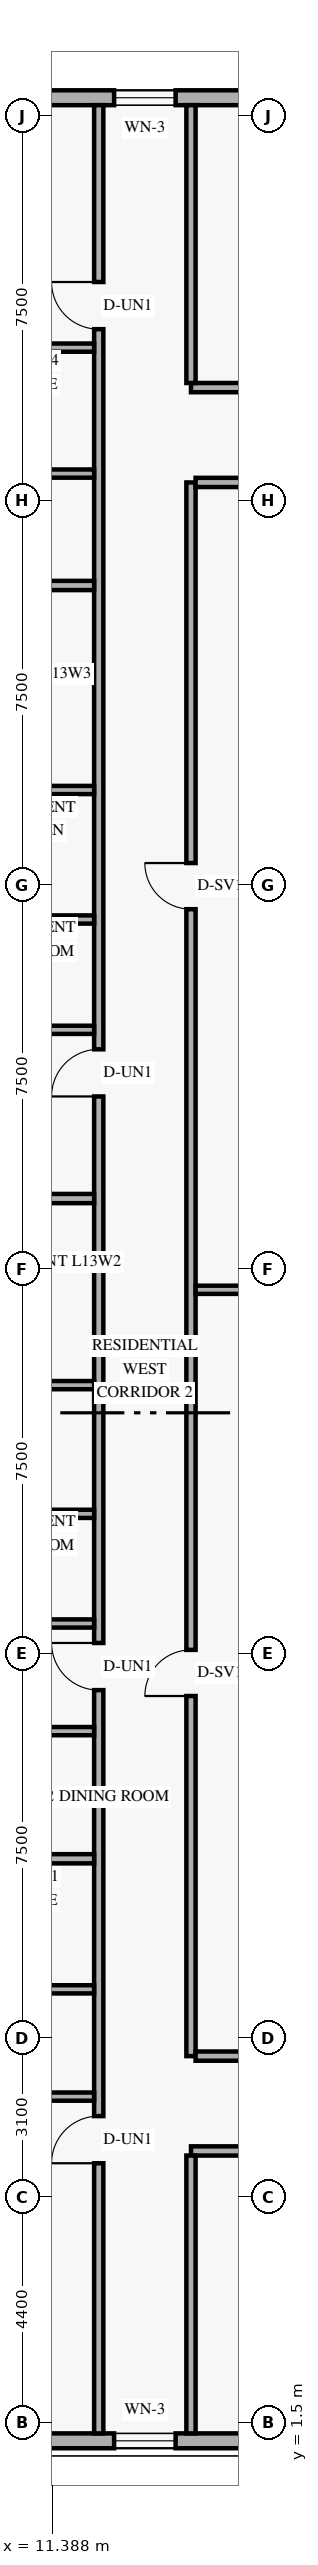
"""IFC4 building model, lengths in metres.
Left out: names, types, materials, properties, quantities, classifications, styles, units other than length and angle.
Written with IfcOpenShell. Run it as: python <this file> out.ifc"""

import sys

from ifc_helpers import new_model, si_unit, direction, frame, frame_2d, origin, place, context, subcontext, project, spatial, rectangle, extrude, element, fill, save


model = new_model("IFC4")
c1 = context("Model", 3, precision=1e-05, world=origin(), true_north=direction((0.0, 1.0)))
c2 = subcontext(c1, "Body", "Model", "MODEL_VIEW")
j1 = project(units=[si_unit("LENGTHUNIT", "METRE"), si_unit("PLANEANGLEUNIT", "RADIAN")], contexts=[c1])
p1 = place(None, origin())
s1 = spatial("IfcSite", under=j1, at=p1, CompositionType="ELEMENT")
p2 = place(p1, origin())
s2 = spatial("IfcBuilding", under=s1, at=p2, CompositionType="ELEMENT")
p3 = place(p2, frame((0.0, 0.0, 52.8)))
s3 = spatial("IfcBuildingStorey", under=s2, at=p3, CompositionType="ELEMENT", Elevation=52.8)
p4 = place(p3, frame((5.42, 1.145, 0.0), z_axis=(0.0, 0.0, 1.0), x_axis=(1.0, 0.0, 0.0)))
e1 = element("IfcWall", 1, at=p4, inside=s3, PredefinedType="SOLIDWALL", context=c2, shape_type="SweptSolid", body=[
    extrude(rectangle(XDim=39.56, YDim=0.29, at=frame_2d((19.78, 0.0))), origin(), (0.0, 0.0, 1.0), 3.36),
])
p5 = place(p4, frame((2.765, 0.0, 0.85)))
e2 = element("IfcOpeningElement", 2, at=p5, cuts=e1, PredefinedType="OPENING", context=c2, shape_type="SweptSolid", body=[
    extrude(rectangle(XDim=1.35, YDim=1.55, at=frame_2d((0.675, 0.775))), frame((0.0, 0.155, 0.0), z_axis=(0.0, -1.0, 0.0), x_axis=(1.0, 0.0, 0.0)), (0.0, 0.0, 1.0), 0.31),
])
p6 = place(p4, frame((7.18, 0.0, 0.85)))
e3 = element("IfcOpeningElement", 3, at=p6, cuts=e1, PredefinedType="OPENING", context=c2, shape_type="SweptSolid", body=[
    extrude(rectangle(XDim=1.2, YDim=1.5, at=frame_2d((0.6, 0.75))), frame((0.0, 0.155, 0.0), z_axis=(0.0, -1.0, 0.0), x_axis=(1.0, 0.0, 0.0)), (0.0, 0.0, 1.0), 0.31),
])
p7 = place(p4, frame((12.482, 0.0, 0.85)))
e4 = element("IfcOpeningElement", 4, at=p7, cuts=e1, PredefinedType="OPENING", context=c2, shape_type="SweptSolid", body=[
    extrude(rectangle(XDim=1.35, YDim=1.55, at=frame_2d((0.675, 0.775))), frame((0.0, 0.155, 0.0), z_axis=(0.0, -1.0, 0.0), x_axis=(1.0, 0.0, 0.0)), (0.0, 0.0, 1.0), 0.31),
])
p8 = place(p4, frame((21.072, 0.0, 0.85)))
e5 = element("IfcOpeningElement", 5, at=p8, cuts=e1, PredefinedType="OPENING", context=c2, shape_type="SweptSolid", body=[
    extrude(rectangle(XDim=1.35, YDim=1.55, at=frame_2d((0.675, 0.775))), frame((0.0, 0.155, 0.0), z_axis=(0.0, -1.0, 0.0), x_axis=(1.0, 0.0, 0.0)), (0.0, 0.0, 1.0), 0.31),
])
p9 = place(p4, frame((27.255, 0.0, 0.85)))
e6 = element("IfcOpeningElement", 6, at=p9, cuts=e1, PredefinedType="OPENING", context=c2, shape_type="SweptSolid", body=[
    extrude(rectangle(XDim=1.35, YDim=1.55, at=frame_2d((0.675, 0.775))), frame((0.0, 0.155, 0.0), z_axis=(0.0, -1.0, 0.0), x_axis=(1.0, 0.0, 0.0)), (0.0, 0.0, 1.0), 0.31),
])
p10 = place(p4, frame((30.39, 0.0, 0.85)))
e7 = element("IfcOpeningElement", 7, at=p10, cuts=e1, PredefinedType="OPENING", context=c2, shape_type="SweptSolid", body=[
    extrude(rectangle(XDim=1.35, YDim=1.55, at=frame_2d((0.675, 0.775))), frame((0.0, 0.155, 0.0), z_axis=(0.0, -1.0, 0.0), x_axis=(1.0, 0.0, 0.0)), (0.0, 0.0, 1.0), 0.31),
])
p11 = place(p4, frame((35.17, 0.0, 0.85)))
e8 = element("IfcOpeningElement", 8, at=p11, cuts=e1, PredefinedType="OPENING", context=c2, shape_type="SweptSolid", body=[
    extrude(rectangle(XDim=1.35, YDim=1.55, at=frame_2d((0.675, 0.775))), frame((0.0, 0.155, 0.0), z_axis=(0.0, -1.0, 0.0), x_axis=(1.0, 0.0, 0.0)), (0.0, 0.0, 1.0), 0.31),
])
p12 = place(p3, frame((44.98, 46.855, 0.0), z_axis=(0.0, 0.0, 1.0), x_axis=(-1.0, 0.0, 0.0)))
e9 = element("IfcWall", 9, at=p12, inside=s3, PredefinedType="SOLIDWALL", context=c2, shape_type="SweptSolid", body=[
    extrude(rectangle(XDim=39.56, YDim=0.29, at=frame_2d((19.78, 0.0))), origin(), (0.0, 0.0, 1.0), 3.36),
])
p13 = place(p12, frame((35.445, 0.0, 0.85)))
e10 = element("IfcOpeningElement", 10, at=p13, cuts=e9, PredefinedType="OPENING", context=c2, shape_type="SweptSolid", body=[
    extrude(rectangle(XDim=1.35, YDim=1.55, at=frame_2d((0.675, 0.775))), frame((0.0, 0.155, 0.0), z_axis=(0.0, -1.0, 0.0), x_axis=(1.0, 0.0, 0.0)), (0.0, 0.0, 1.0), 0.31),
])
p14 = place(p12, frame((31.18, 0.0, 0.85)))
e11 = element("IfcOpeningElement", 11, at=p14, cuts=e9, PredefinedType="OPENING", context=c2, shape_type="SweptSolid", body=[
    extrude(rectangle(XDim=1.2, YDim=1.5, at=frame_2d((0.6, 0.75))), frame((0.0, 0.155, 0.0), z_axis=(0.0, -1.0, 0.0), x_axis=(1.0, 0.0, 0.0)), (0.0, 0.0, 1.0), 0.31),
])
p15 = place(p12, frame((25.088, 0.0, 0.85)))
e12 = element("IfcOpeningElement", 12, at=p15, cuts=e9, PredefinedType="OPENING", context=c2, shape_type="SweptSolid", body=[
    extrude(rectangle(XDim=1.35, YDim=1.55, at=frame_2d((0.675, 0.775))), frame((0.0, 0.155, 0.0), z_axis=(0.0, -1.0, 0.0), x_axis=(1.0, 0.0, 0.0)), (0.0, 0.0, 1.0), 0.31),
])
p16 = place(p12, frame((16.498, 0.0, 0.85)))
e13 = element("IfcOpeningElement", 13, at=p16, cuts=e9, PredefinedType="OPENING", context=c2, shape_type="SweptSolid", body=[
    extrude(rectangle(XDim=1.35, YDim=1.55, at=frame_2d((0.675, 0.775))), frame((0.0, 0.155, 0.0), z_axis=(0.0, -1.0, 0.0), x_axis=(1.0, 0.0, 0.0)), (0.0, 0.0, 1.0), 0.31),
])
p17 = place(p12, frame((10.955, 0.0, 0.85)))
e14 = element("IfcOpeningElement", 14, at=p17, cuts=e9, PredefinedType="OPENING", context=c2, shape_type="SweptSolid", body=[
    extrude(rectangle(XDim=1.35, YDim=1.55, at=frame_2d((0.675, 0.775))), frame((0.0, 0.155, 0.0), z_axis=(0.0, -1.0, 0.0), x_axis=(1.0, 0.0, 0.0)), (0.0, 0.0, 1.0), 0.31),
])
p18 = place(p12, frame((7.82, 0.0, 0.85)))
e15 = element("IfcOpeningElement", 15, at=p18, cuts=e9, PredefinedType="OPENING", context=c2, shape_type="SweptSolid", body=[
    extrude(rectangle(XDim=1.35, YDim=1.55, at=frame_2d((0.675, 0.775))), frame((0.0, 0.155, 0.0), z_axis=(0.0, -1.0, 0.0), x_axis=(1.0, 0.0, 0.0)), (0.0, 0.0, 1.0), 0.31),
])
p19 = place(p12, frame((4.008, 0.0, 0.85)))
e16 = element("IfcOpeningElement", 16, at=p19, cuts=e9, PredefinedType="OPENING", context=c2, shape_type="SweptSolid", body=[
    extrude(rectangle(XDim=1.35, YDim=1.55, at=frame_2d((0.675, 0.775))), frame((0.0, 0.155, 0.0), z_axis=(0.0, -1.0, 0.0), x_axis=(1.0, 0.0, 0.0)), (0.0, 0.0, 1.0), 0.31),
])
p20 = place(p12, frame((0.292, 0.0, 0.85)))
e17 = element("IfcOpeningElement", 17, at=p20, cuts=e9, PredefinedType="OPENING", context=c2, shape_type="SweptSolid", body=[
    extrude(rectangle(XDim=1.35, YDim=1.55, at=frame_2d((0.675, 0.775))), frame((0.0, 0.155, 0.0), z_axis=(0.0, -1.0, 0.0), x_axis=(1.0, 0.0, 0.0)), (0.0, 0.0, 1.0), 0.31),
])
p21 = place(p3, frame((14.1, 6.8, 0.0), z_axis=(0.0, 0.0, 1.0), x_axis=(1.0, 0.0, 0.0)))
e18 = element("IfcWall", 18, at=p21, inside=s3, PredefinedType="STANDARD", context=c2, shape_type="SweptSolid", body=[
    extrude(rectangle(XDim=21.32, YDim=0.18, at=frame_2d((10.66, 0.0))), origin(), (0.0, 0.0, 1.0), 2.649),
])
p22 = place(p21, frame((1.5, 0.0, 0.0)))
e19 = element("IfcOpeningElement", 19, at=p22, cuts=e18, PredefinedType="OPENING", context=c2, shape_type="SweptSolid", body=[
    extrude(rectangle(XDim=0.95, YDim=2.15, at=frame_2d((0.475, 1.075))), frame((0.0, 0.1, 0.0), z_axis=(0.0, -1.0, 0.0), x_axis=(1.0, 0.0, 0.0)), (0.0, 0.0, 1.0), 0.2),
])
p23 = place(p21, frame((10.625, 0.0, 0.0)))
e20 = element("IfcOpeningElement", 20, at=p23, cuts=e18, PredefinedType="OPENING", context=c2, shape_type="SweptSolid", body=[
    extrude(rectangle(XDim=0.92, YDim=2.15, at=frame_2d((0.46, 1.075))), frame((0.0, 0.1, 0.0), z_axis=(0.0, -1.0, 0.0), x_axis=(1.0, 0.0, 0.0)), (0.0, 0.0, 1.0), 0.2),
])
p24 = place(p3, frame((14.1, 41.2, 0.0), z_axis=(0.0, 0.0, 1.0), x_axis=(1.0, 0.0, 0.0)))
e21 = element("IfcWall", 21, at=p24, inside=s3, PredefinedType="STANDARD", context=c2, shape_type="SweptSolid", body=[
    extrude(rectangle(XDim=21.32, YDim=0.18, at=frame_2d((10.66, 0.0))), origin(), (0.0, 0.0, 1.0), 2.649),
])
p25 = place(p24, frame((1.6, 0.0, 0.0)))
e22 = element("IfcOpeningElement", 22, at=p25, cuts=e21, PredefinedType="OPENING", context=c2, shape_type="SweptSolid", body=[
    extrude(rectangle(XDim=0.95, YDim=2.15, at=frame_2d((0.475, 1.075))), frame((0.0, 0.1, 0.0), z_axis=(0.0, -1.0, 0.0), x_axis=(1.0, 0.0, 0.0)), (0.0, 0.0, 1.0), 0.2),
])
p26 = place(p24, frame((10.644, 0.0, 0.0)))
e23 = element("IfcOpeningElement", 23, at=p26, cuts=e21, PredefinedType="OPENING", context=c2, shape_type="SweptSolid", body=[
    extrude(rectangle(XDim=0.92, YDim=2.15, at=frame_2d((0.46, 1.075))), frame((0.0, 0.1, 0.0), z_axis=(0.0, -1.0, 0.0), x_axis=(1.0, 0.0, 0.0)), (0.0, 0.0, 1.0), 0.2),
])
p27 = place(p3, frame((12.3, 1.29, 0.0), z_axis=(0.0, 0.0, 1.0), x_axis=(0.0, 1.0, 0.0)))
e24 = element("IfcWall", 24, at=p27, inside=s3, PredefinedType="STANDARD", context=c2, shape_type="SweptSolid", body=[
    extrude(rectangle(XDim=45.42, YDim=0.18, at=frame_2d((22.71, 0.0))), origin(), (0.0, 0.0, 1.0), 2.649),
])
p28 = place(p27, frame((5.27, 0.0, 0.0)))
e25 = element("IfcOpeningElement", 25, at=p28, cuts=e24, PredefinedType="OPENING", context=c2, shape_type="SweptSolid", body=[
    extrude(rectangle(XDim=0.92, YDim=2.15, at=frame_2d((0.46, 1.075))), frame((0.0, 0.1, 0.0), z_axis=(0.0, -1.0, 0.0), x_axis=(1.0, 0.0, 0.0)), (0.0, 0.0, 1.0), 0.2),
])
p29 = place(p27, frame((14.5, 0.0, 0.0)))
e26 = element("IfcOpeningElement", 26, at=p29, cuts=e24, PredefinedType="OPENING", context=c2, shape_type="SweptSolid", body=[
    extrude(rectangle(XDim=0.92, YDim=2.15, at=frame_2d((0.46, 1.075))), frame((0.0, 0.1, 0.0), z_axis=(0.0, -1.0, 0.0), x_axis=(1.0, 0.0, 0.0)), (0.0, 0.0, 1.0), 0.2),
])
p30 = place(p27, frame((26.082, 0.0, 0.0)))
e27 = element("IfcOpeningElement", 27, at=p30, cuts=e24, PredefinedType="OPENING", context=c2, shape_type="SweptSolid", body=[
    extrude(rectangle(XDim=0.92, YDim=2.15, at=frame_2d((0.46, 1.075))), frame((0.0, 0.1, 0.0), z_axis=(0.0, -1.0, 0.0), x_axis=(1.0, 0.0, 0.0)), (0.0, 0.0, 1.0), 0.2),
])
p31 = place(p27, frame((41.05, 0.0, 0.0)))
e28 = element("IfcOpeningElement", 28, at=p31, cuts=e24, PredefinedType="OPENING", context=c2, shape_type="SweptSolid", body=[
    extrude(rectangle(XDim=0.92, YDim=2.15, at=frame_2d((0.46, 1.075))), frame((0.0, 0.1, 0.0), z_axis=(0.0, -1.0, 0.0), x_axis=(1.0, 0.0, 0.0)), (0.0, 0.0, 1.0), 0.2),
])
p32 = place(p3, frame((14.1, 8.65, 0.0), z_axis=(0.0, 0.0, 1.0), x_axis=(0.0, 1.0, 0.0)))
e29 = element("IfcWall", 29, at=p32, inside=s3, PredefinedType="STANDARD", context=c2, shape_type="SweptSolid", body=[
    extrude(rectangle(XDim=30.7, YDim=0.18, at=frame_2d((15.35, 0.0))), origin(), (0.0, 0.0, 1.0), 2.649),
])
p33 = place(p32, frame((7.025, 0.0, 0.0)))
e30 = element("IfcOpeningElement", 30, at=p33, cuts=e29, PredefinedType="OPENING", context=c2, shape_type="SweptSolid", body=[
    extrude(rectangle(XDim=0.9, YDim=2.1, at=frame_2d((0.45, 1.05))), frame((0.0, 0.1, 0.0), z_axis=(0.0, -1.0, 0.0), x_axis=(1.0, 0.0, 0.0)), (0.0, 0.0, 1.0), 0.2),
])
p34 = place(p32, frame((22.375, 0.0, 0.0)))
e31 = element("IfcOpeningElement", 31, at=p34, cuts=e29, PredefinedType="OPENING", context=c2, shape_type="SweptSolid", body=[
    extrude(rectangle(XDim=0.9, YDim=2.1, at=frame_2d((0.45, 1.05))), frame((0.0, 0.1, 0.0), z_axis=(0.0, -1.0, 0.0), x_axis=(1.0, 0.0, 0.0)), (0.0, 0.0, 1.0), 0.2),
])
for number, where, z_axis, x_axis in (
    (32, (14.19, 8.65, 0.0), (0.0, 0.0, 1.0), (1.0, 0.0, 0.0)),
    (33, (14.19, 39.35, 0.0), (0.0, 0.0, 1.0), (1.0, 0.0, 0.0)),
):
    element("IfcWall", number, at=place(p3, frame(where, z_axis=z_axis, x_axis=x_axis)), inside=s3, PredefinedType="STANDARD", context=c2, shape_type="SweptSolid", body=[
        extrude(rectangle(XDim=7.37, YDim=0.18, at=frame_2d((3.685, 0.0))), origin(), (0.0, 0.0, 1.0), 2.649),
    ])
for number, where, z_axis, x_axis in (
    (34, (14.1, 1.29, 0.0), (0.0, 0.0, 1.0), (0.0, 1.0, 0.0)),
    (35, (14.1, 41.29, 0.0), (0.0, 0.0, 1.0), (0.0, 1.0, 0.0)),
):
    element("IfcWall", number, at=place(p3, frame(where, z_axis=z_axis, x_axis=x_axis)), inside=s3, PredefinedType="PARTITIONING", context=c2, shape_type="SweptSolid", body=[
        extrude(rectangle(XDim=5.42, YDim=0.18, at=frame_2d((2.71, 0.0))), origin(), (0.0, 0.0, 1.0), 2.809),
    ])
p35 = place(p3, frame((8.43, 7.86, 0.0), z_axis=(0.0, 0.0, 1.0), x_axis=(1.0, 0.0, 0.0)))
e36 = element("IfcWall", 36, at=p35, inside=s3, PredefinedType="PLUMBINGWALL", context=c2, shape_type="SweptSolid", body=[
    extrude(rectangle(XDim=3.78, YDim=0.16, at=frame_2d((1.89, 0.0))), origin(), (0.0, 0.0, 1.0), 2.649),
])
p36 = place(p3, frame((8.59, 9.953, 0.0), z_axis=(0.0, 0.0, 1.0), x_axis=(1.0, 0.0, 0.0)))
e37 = element("IfcWall", 37, at=p36, inside=s3, PredefinedType="PLUMBINGWALL", context=c2, shape_type="SweptSolid", body=[
    extrude(rectangle(XDim=3.62, YDim=0.16, at=frame_2d((1.81, 0.0))), origin(), (0.0, 0.0, 1.0), 2.649),
])
p37 = place(p3, frame((2.09, 12.5, 0.0), z_axis=(0.0, 0.0, 1.0), x_axis=(1.0, 0.0, 0.0)))
e38 = element("IfcWall", 38, at=p37, inside=s3, PredefinedType="PARTITIONING", context=c2, shape_type="SweptSolid", body=[
    extrude(rectangle(XDim=10.12, YDim=0.18, at=frame_2d((5.06, 0.0))), origin(), (0.0, 0.0, 1.0), 2.649),
])
p38 = place(p3, frame((2.09, 21.74, 0.0), z_axis=(0.0, 0.0, 1.0), x_axis=(1.0, 0.0, 0.0)))
e39 = element("IfcWall", 39, at=p38, inside=s3, PredefinedType="PARTITIONING", context=c2, shape_type="SweptSolid", body=[
    extrude(rectangle(XDim=10.12, YDim=0.16, at=frame_2d((5.06, 0.0))), origin(), (0.0, 0.0, 1.0), 2.649),
])
p39 = place(p38, frame((7.185, 0.0, 0.0)))
e40 = element("IfcOpeningElement", 40, at=p39, cuts=e39, PredefinedType="OPENING", context=c2, shape_type="SweptSolid", body=[
    extrude(rectangle(XDim=0.88, YDim=2.12, at=frame_2d((0.44, 1.06))), frame((0.0, 0.09, 0.0), z_axis=(0.0, -1.0, 0.0), x_axis=(1.0, 0.0, 0.0)), (0.0, 0.0, 1.0), 0.18),
])
p40 = place(p38, frame((1.955, 0.0, 0.0)))
e41 = element("IfcOpeningElement", 41, at=p40, cuts=e39, PredefinedType="OPENING", context=c2, shape_type="SweptSolid", body=[
    extrude(rectangle(XDim=0.9, YDim=2.14, at=frame_2d((0.45, 1.07))), frame((0.0, 0.09, 0.0), z_axis=(0.0, -1.0, 0.0), x_axis=(1.0, 0.0, 0.0)), (0.0, 0.0, 1.0), 0.18),
])
p41 = place(p3, frame((8.43, 17.09, 0.0), z_axis=(0.0, 0.0, 1.0), x_axis=(1.0, 0.0, 0.0)))
e42 = element("IfcWall", 42, at=p41, inside=s3, PredefinedType="PLUMBINGWALL", context=c2, shape_type="SweptSolid", body=[
    extrude(rectangle(XDim=3.78, YDim=0.16, at=frame_2d((1.89, 0.0))), origin(), (0.0, 0.0, 1.0), 2.649),
])
p42 = place(p3, frame((8.59, 19.229, 0.0), z_axis=(0.0, 0.0, 1.0), x_axis=(1.0, 0.0, 0.0)))
e43 = element("IfcWall", 43, at=p42, inside=s3, PredefinedType="PLUMBINGWALL", context=c2, shape_type="SweptSolid", body=[
    extrude(rectangle(XDim=3.62, YDim=0.16, at=frame_2d((1.81, 0.0))), origin(), (0.0, 0.0, 1.0), 2.649),
])
p43 = place(p3, frame((2.09, 14.99, 0.0), z_axis=(0.0, 0.0, 1.0), x_axis=(1.0, 0.0, 0.0)))
e44 = element("IfcWall", 44, at=p43, inside=s3, PredefinedType="PARTITIONING", context=c2, shape_type="SweptSolid", body=[
    extrude(rectangle(XDim=10.12, YDim=0.16, at=frame_2d((5.06, 0.0))), origin(), (0.0, 0.0, 1.0), 2.649),
])
p44 = place(p43, frame((4.51, 0.0, 0.0)))
e45 = element("IfcOpeningElement", 45, at=p44, cuts=e44, PredefinedType="OPENING", context=c2, shape_type="SweptSolid", body=[
    extrude(rectangle(XDim=0.95, YDim=2.15, at=frame_2d((0.475, 1.075))), frame((0.0, 0.09, 0.0), z_axis=(0.0, -1.0, 0.0), x_axis=(1.0, 0.0, 0.0)), (0.0, 0.0, 1.0), 0.18),
])
p45 = place(p3, frame((2.09, 25.38, 0.0), z_axis=(0.0, 0.0, 1.0), x_axis=(1.0, 0.0, 0.0)))
e46 = element("IfcWall", 46, at=p45, inside=s3, PredefinedType="PARTITIONING", context=c2, shape_type="SweptSolid", body=[
    extrude(rectangle(XDim=10.12, YDim=0.18, at=frame_2d((5.06, 0.0))), origin(), (0.0, 0.0, 1.0), 2.649),
])
p46 = place(p3, frame((2.09, 33.35, 0.0), z_axis=(0.0, 0.0, 1.0), x_axis=(1.0, 0.0, 0.0)))
e47 = element("IfcWall", 47, at=p46, inside=s3, PredefinedType="PARTITIONING", context=c2, shape_type="SweptSolid", body=[
    extrude(rectangle(XDim=10.12, YDim=0.16, at=frame_2d((5.06, 0.0))), origin(), (0.0, 0.0, 1.0), 2.649),
])
p47 = place(p46, frame((1.94, 0.0, 0.0)))
e48 = element("IfcOpeningElement", 48, at=p47, cuts=e47, PredefinedType="OPENING", context=c2, shape_type="SweptSolid", body=[
    extrude(rectangle(XDim=0.88, YDim=2.14, at=frame_2d((0.44, 1.07))), frame((0.0, 0.09, 0.0), z_axis=(0.0, -1.0, 0.0), x_axis=(1.0, 0.0, 0.0)), (0.0, 0.0, 1.0), 0.18),
])
p48 = place(p46, frame((5.26, 0.0, 0.0)))
e49 = element("IfcOpeningElement", 49, at=p48, cuts=e47, PredefinedType="OPENING", context=c2, shape_type="SweptSolid", body=[
    extrude(rectangle(XDim=0.88, YDim=2.14, at=frame_2d((0.44, 1.07))), frame((0.0, 0.09, 0.0), z_axis=(0.0, -1.0, 0.0), x_axis=(1.0, 0.0, 0.0)), (0.0, 0.0, 1.0), 0.18),
])
p49 = place(p3, frame((8.43, 28.671, 0.0), z_axis=(0.0, 0.0, 1.0), x_axis=(1.0, 0.0, 0.0)))
e50 = element("IfcWall", 50, at=p49, inside=s3, PredefinedType="PLUMBINGWALL", context=c2, shape_type="SweptSolid", body=[
    extrude(rectangle(XDim=3.78, YDim=0.16, at=frame_2d((1.89, 0.0))), origin(), (0.0, 0.0, 1.0), 2.649),
])
p50 = place(p3, frame((8.59, 30.823, 0.0), z_axis=(0.0, 0.0, 1.0), x_axis=(1.0, 0.0, 0.0)))
e51 = element("IfcWall", 51, at=p50, inside=s3, PredefinedType="PLUMBINGWALL", context=c2, shape_type="SweptSolid", body=[
    extrude(rectangle(XDim=3.62, YDim=0.16, at=frame_2d((1.81, 0.0))), origin(), (0.0, 0.0, 1.0), 2.649),
])
p51 = place(p3, frame((2.09, 37.34, 0.0), z_axis=(0.0, 0.0, 1.0), x_axis=(1.0, 0.0, 0.0)))
e52 = element("IfcWall", 52, at=p51, inside=s3, PredefinedType="PARTITIONING", context=c2, shape_type="SweptSolid", body=[
    extrude(rectangle(XDim=10.12, YDim=0.18, at=frame_2d((5.06, 0.0))), origin(), (0.0, 0.0, 1.0), 2.649),
])
p52 = place(p3, frame((8.43, 41.98, 0.0), z_axis=(0.0, 0.0, 1.0), x_axis=(1.0, 0.0, 0.0)))
e53 = element("IfcWall", 53, at=p52, inside=s3, PredefinedType="PLUMBINGWALL", context=c2, shape_type="SweptSolid", body=[
    extrude(rectangle(XDim=3.78, YDim=0.16, at=frame_2d((1.89, 0.0))), origin(), (0.0, 0.0, 1.0), 2.809),
])
p53 = place(p3, frame((8.59, 39.523, 0.0), z_axis=(0.0, 0.0, 1.0), x_axis=(1.0, 0.0, 0.0)))
e54 = element("IfcWall", 54, at=p53, inside=s3, PredefinedType="PLUMBINGWALL", context=c2, shape_type="SweptSolid", body=[
    extrude(rectangle(XDim=3.62, YDim=0.16, at=frame_2d((1.81, 0.0))), origin(), (0.0, 0.0, 1.0), 2.649),
])
p54 = place(p3, frame((14.19, 23.6, 0.0), z_axis=(0.0, 0.0, 1.0), x_axis=(1.0, 0.0, 0.0)))
e55 = element("IfcWall", 55, at=p54, inside=s3, PredefinedType="PARTITIONING", context=c2, shape_type="SweptSolid", body=[
    extrude(rectangle(XDim=7.37, YDim=0.16, at=frame_2d((3.685, 0.0))), origin(), (0.0, 0.0, 1.0), 2.649),
])
p55 = place(p6, origin())
e56 = element("IfcWindow", 56, at=p55, inside=s3, PartitioningType="SINGLE_PANEL", PredefinedType="WINDOW", context=c2, shape_type="SweptSolid", body=[
    extrude(rectangle(XDim=1.2, YDim=1.5, at=frame_2d((0.6, 0.75))), frame((0.0, 0.03, 0.0), z_axis=(0.0, -1.0, 0.0), x_axis=(1.0, 0.0, 0.0)), (0.0, 0.0, 1.0), 0.06),
])
fill(e3, e56)
p56 = place(p14, origin())
e57 = element("IfcWindow", 57, at=p56, inside=s3, PartitioningType="SINGLE_PANEL", PredefinedType="WINDOW", context=c2, shape_type="SweptSolid", body=[
    extrude(rectangle(XDim=1.2, YDim=1.5, at=frame_2d((0.6, 0.75))), frame((0.0, 0.03, 0.0), z_axis=(0.0, -1.0, 0.0), x_axis=(1.0, 0.0, 0.0)), (0.0, 0.0, 1.0), 0.06),
])
fill(e11, e57)
p57 = place(p28, origin())
e58 = element("IfcDoor", 58, at=p57, inside=s3, OperationType="SINGLE_SWING_LEFT", PredefinedType="DOOR", context=c2, shape_type="SweptSolid", body=[
    extrude(rectangle(XDim=0.92, YDim=2.15, at=frame_2d((0.46, 1.075))), frame((0.0, 0.025, 0.0), z_axis=(0.0, -1.0, 0.0), x_axis=(1.0, 0.0, 0.0)), (0.0, 0.0, 1.0), 0.05),
])
fill(e25, e58)
p58 = place(p29, origin())
e59 = element("IfcDoor", 59, at=p58, inside=s3, OperationType="SINGLE_SWING_RIGHT", PredefinedType="DOOR", context=c2, shape_type="SweptSolid", body=[
    extrude(rectangle(XDim=0.92, YDim=2.15, at=frame_2d((0.46, 1.075))), frame((0.0, 0.025, 0.0), z_axis=(0.0, -1.0, 0.0), x_axis=(1.0, 0.0, 0.0)), (0.0, 0.0, 1.0), 0.05),
])
fill(e26, e59)
p59 = place(p30, origin())
e60 = element("IfcDoor", 60, at=p59, inside=s3, OperationType="SINGLE_SWING_LEFT", PredefinedType="DOOR", context=c2, shape_type="SweptSolid", body=[
    extrude(rectangle(XDim=0.92, YDim=2.15, at=frame_2d((0.46, 1.075))), frame((0.0, 0.025, 0.0), z_axis=(0.0, -1.0, 0.0), x_axis=(1.0, 0.0, 0.0)), (0.0, 0.0, 1.0), 0.05),
])
fill(e27, e60)
p60 = place(p31, origin())
e61 = element("IfcDoor", 61, at=p60, inside=s3, OperationType="SINGLE_SWING_RIGHT", PredefinedType="DOOR", context=c2, shape_type="SweptSolid", body=[
    extrude(rectangle(XDim=0.92, YDim=2.15, at=frame_2d((0.46, 1.075))), frame((0.0, 0.025, 0.0), z_axis=(0.0, -1.0, 0.0), x_axis=(1.0, 0.0, 0.0)), (0.0, 0.0, 1.0), 0.05),
])
fill(e28, e61)
p61 = place(p33, origin())
e62 = element("IfcDoor", 62, at=p61, inside=s3, OperationType="SINGLE_SWING_LEFT", PredefinedType="DOOR", context=c2, shape_type="SweptSolid", body=[
    extrude(rectangle(XDim=0.9, YDim=2.1, at=frame_2d((0.45, 1.05))), frame((0.0, 0.025, 0.0), z_axis=(0.0, -1.0, 0.0), x_axis=(1.0, 0.0, 0.0)), (0.0, 0.0, 1.0), 0.05),
])
fill(e30, e62)
p62 = place(p34, origin())
e63 = element("IfcDoor", 63, at=p62, inside=s3, OperationType="SINGLE_SWING_RIGHT", PredefinedType="DOOR", context=c2, shape_type="SweptSolid", body=[
    extrude(rectangle(XDim=0.9, YDim=2.1, at=frame_2d((0.45, 1.05))), frame((0.0, 0.025, 0.0), z_axis=(0.0, -1.0, 0.0), x_axis=(1.0, 0.0, 0.0)), (0.0, 0.0, 1.0), 0.05),
])
fill(e31, e63)
save(model, sys.argv[1])
